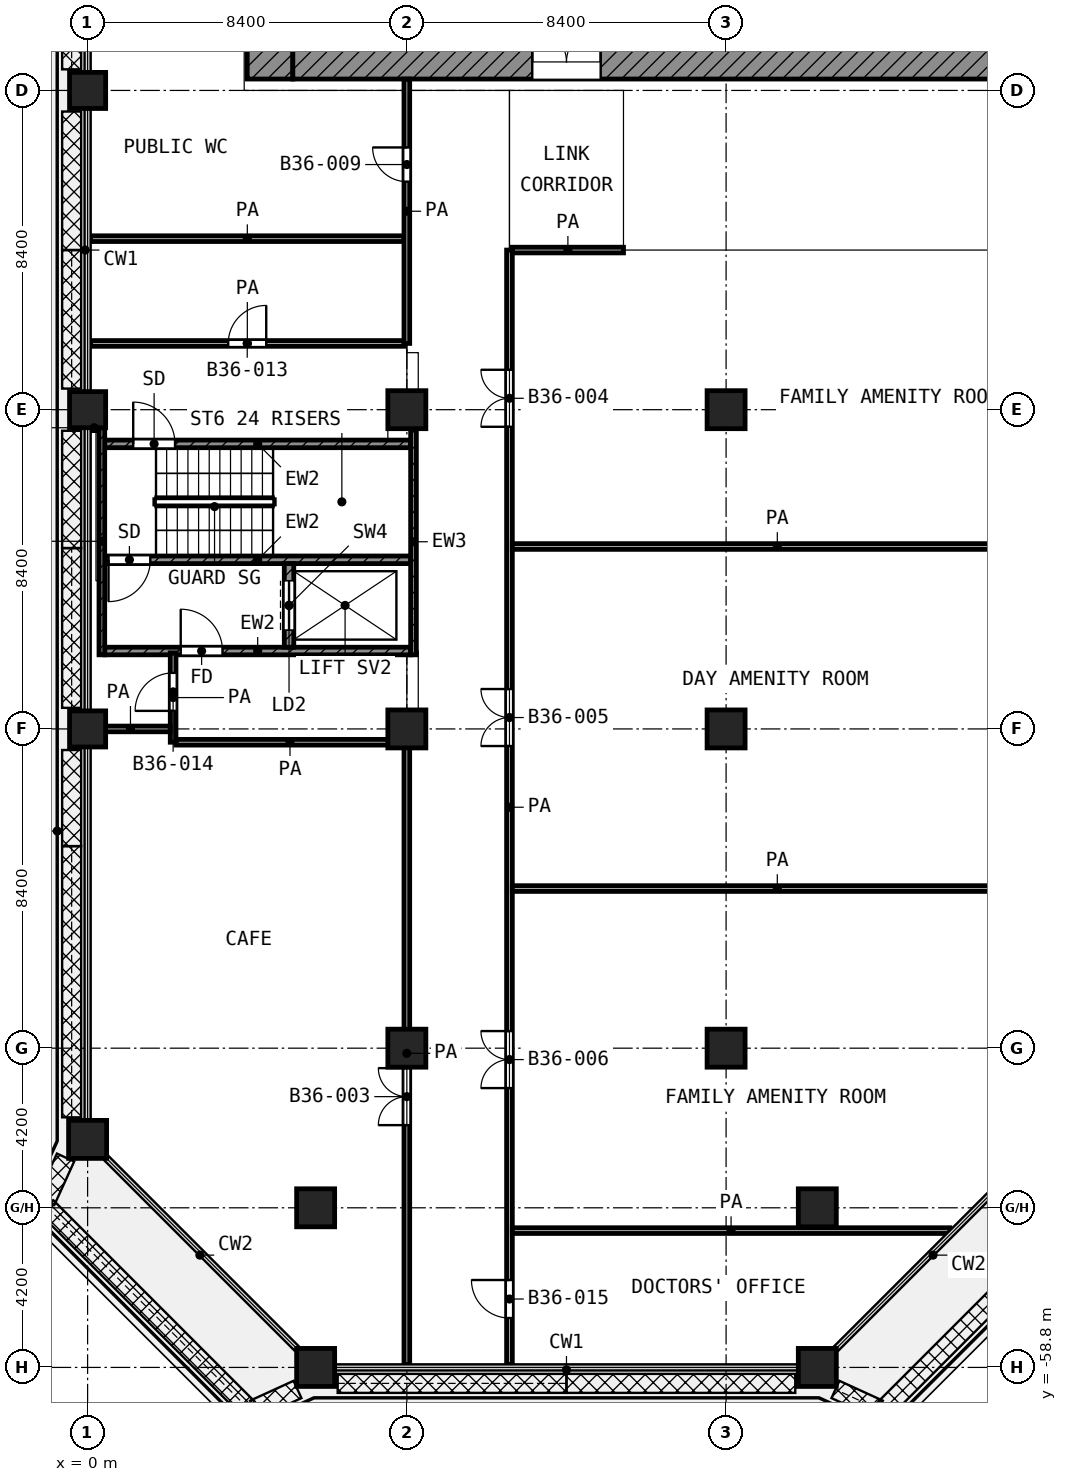
"""IFC4 building model, lengths in metres.
Left out: names, types, materials, properties, quantities, classifications, styles, units other than length and angle.
Written with IfcOpenShell. Run it as: python <this file> out.ifc"""

import sys

from ifc_helpers import new_model, si_unit, direction, frame, frame_2d, origin, origin_2d, place, context, subcontext, project, spatial, rectangle, extrude, element, fill, save


model = new_model("IFC4")
c1 = context("Model", 3, precision=1e-05, world=origin(), true_north=direction((0.0, 1.0)))
c2 = subcontext(c1, "Body", "Model", "MODEL_VIEW")
j1 = project(units=[si_unit("LENGTHUNIT", "METRE"), si_unit("PLANEANGLEUNIT", "RADIAN")], contexts=[c1])
p1 = place(None, origin())
s1 = spatial("IfcSite", under=j1, at=p1, CompositionType="ELEMENT")
p2 = place(p1, origin())
s2 = spatial("IfcBuilding", under=s1, at=p2, CompositionType="ELEMENT")
p3 = place(p2, frame((0.0, 0.0, 158.4)))
s3 = spatial("IfcBuildingStorey", under=s2, at=p3, CompositionType="ELEMENT", Elevation=158.4)
for number, where, z_axis, x_axis in (
    (1, (0.0, -25.2, 0.0), (0.0, 0.0, 1.0), (1.0, 0.0, 0.0)),
    (2, (0.0, -33.6, 0.0), (0.0, 0.0, 1.0), (1.0, 0.0, 0.0)),
):
    element("IfcColumn", number, at=place(p3, frame(where, z_axis=z_axis, x_axis=x_axis)), inside=s3, PredefinedType="COLUMN", context=c2, shape_type="SweptSolid", body=[
        extrude(rectangle(XDim=0.95, YDim=0.95, at=origin_2d()), origin(), (0.0, 0.0, 1.0), 4.2),
    ])
for number, where, z_axis, x_axis in (
    (3, (8.4, -33.6, 0.0), (0.0, 0.0, 1.0), (1.0, 0.0, 0.0)),
    (4, (16.8, -33.6, 0.0), (0.0, 0.0, 1.0), (1.0, 0.0, 0.0)),
):
    element("IfcColumn", number, at=place(p3, frame(where, z_axis=z_axis, x_axis=x_axis)), inside=s3, PredefinedType="COLUMN", context=c2, shape_type="SweptSolid", body=[
        extrude(rectangle(XDim=1.0, YDim=1.0, at=origin_2d()), origin(), (0.0, 0.0, 1.0), 4.2),
    ])
p4 = place(p3, frame((0.0, -42.0, 0.0), z_axis=(0.0, 0.0, 1.0), x_axis=(1.0, 0.0, 0.0)))
e5 = element("IfcColumn", 5, at=p4, inside=s3, PredefinedType="COLUMN", context=c2, shape_type="SweptSolid", body=[
    extrude(rectangle(XDim=0.95, YDim=0.95, at=origin_2d()), origin(), (0.0, 0.0, 1.0), 4.2),
])
for number, where, z_axis, x_axis in (
    (6, (8.4, -42.0, 0.0), (0.0, 0.0, 1.0), (1.0, 0.0, 0.0)),
    (7, (16.8, -42.0, 0.0), (0.0, 0.0, 1.0), (1.0, 0.0, 0.0)),
    (8, (8.4, -50.4, 0.0), (0.0, 0.0, 1.0), (1.0, 0.0, 0.0)),
    (9, (16.8, -50.4, 0.0), (0.0, 0.0, 1.0), (1.0, 0.0, 0.0)),
    (10, (0.0, -52.8, 0.0), (0.0, 0.0, 1.0), (1.0, 0.0, 0.0)),
    (11, (6.0, -54.6, 0.0), (0.0, 0.0, 1.0), (1.0, 0.0, 0.0)),
    (12, (19.2, -54.6, 0.0), (0.0, 0.0, 1.0), (1.0, 0.0, 0.0)),
    (13, (6.0, -58.8, 0.0), (0.0, 0.0, 1.0), (1.0, 0.0, 0.0)),
    (14, (19.2, -58.8, 0.0), (0.0, 0.0, 1.0), (1.0, 0.0, 0.0)),
):
    element("IfcColumn", number, at=place(p3, frame(where, z_axis=z_axis, x_axis=x_axis)), inside=s3, PredefinedType="COLUMN", context=c2, shape_type="SweptSolid", body=[
        extrude(rectangle(XDim=1.0, YDim=1.0, at=origin_2d()), origin(), (0.0, 0.0, 1.0), 4.2),
    ])
p5 = place(p3, frame((4.8, -24.9, 0.0), z_axis=(0.0, 0.0, 1.0), x_axis=(0.0, 1.0, 0.0)))
e15 = element("IfcWall", 15, at=p5, inside=s3, PredefinedType="SHEAR", context=c2, shape_type="SweptSolid", body=[
    extrude(rectangle(XDim=19.5, YDim=1.2, at=frame_2d((9.75, 0.0))), origin(), (0.0, 0.0, 1.0), 3.6),
])
p6 = place(p5, frame((11.35, 0.0, 0.0)))
e16 = element("IfcOpeningElement", 16, at=p6, cuts=e15, PredefinedType="OPENING", context=c2, shape_type="SweptSolid", body=[
    extrude(rectangle(XDim=1.1, YDim=2.1, at=frame_2d((0.55, 1.05))), frame((0.0, 0.61, 0.0), z_axis=(0.0, -1.0, 0.0), x_axis=(1.0, 0.0, 0.0)), (0.0, 0.0, 1.0), 1.22),
])
p7 = place(p5, frame((2.05, 0.0, 0.0)))
e17 = element("IfcOpeningElement", 17, at=p7, cuts=e15, PredefinedType="OPENING", context=c2, shape_type="SweptSolid", body=[
    extrude(rectangle(XDim=1.1, YDim=2.1, at=frame_2d((0.55, 1.05))), frame((0.0, 0.61, 0.0), z_axis=(0.0, -1.0, 0.0), x_axis=(1.0, 0.0, 0.0)), (0.0, 0.0, 1.0), 1.22),
])
p8 = place(p3, frame((5.4, -24.45, 0.0), z_axis=(0.0, 0.0, 1.0), x_axis=(1.0, 0.0, 0.0)))
e18 = element("IfcWall", 18, at=p8, inside=s3, PredefinedType="SHEAR", context=c2, shape_type="SweptSolid", body=[
    extrude(rectangle(XDim=18.6, YDim=0.9, at=frame_2d((9.3, 0.0))), origin(), (0.0, 0.0, 1.0), 3.6),
])
p9 = place(p8, frame((6.3, 0.0, 0.0)))
e19 = element("IfcOpeningElement", 19, at=p9, cuts=e18, PredefinedType="OPENING", context=c2, shape_type="SweptSolid", body=[
    extrude(rectangle(XDim=1.8, YDim=2.1, at=frame_2d((0.9, 1.05))), frame((0.0, 0.46, 0.0), z_axis=(0.0, -1.0, 0.0), x_axis=(1.0, 0.0, 0.0)), (0.0, 0.0, 1.0), 0.92),
])
p10 = place(p3, frame((0.375, -40.05, 0.0), z_axis=(0.0, 0.0, 1.0), x_axis=(0.0, 1.0, 0.0)))
e20 = element("IfcWall", 20, at=p10, inside=s3, PredefinedType="SHEAR", context=c2, shape_type="SweptSolid", body=[
    extrude(rectangle(XDim=5.975, YDim=0.15, at=frame_2d((2.988, 0.0))), origin(), (0.0, 0.0, 1.0), 3.6),
])
p11 = place(p3, frame((8.575, -40.05, 0.0), z_axis=(0.0, 0.0, 1.0), x_axis=(0.0, 1.0, 0.0)))
e21 = element("IfcWall", 21, at=p11, inside=s3, PredefinedType="SHEAR", context=c2, shape_type="SweptSolid", body=[
    extrude(rectangle(XDim=5.95, YDim=0.15, at=frame_2d((2.975, 0.0))), origin(), (0.0, 0.0, 1.0), 3.6),
])
p12 = place(p3, frame((0.45, -34.5, 0.0), z_axis=(0.0, 0.0, 1.0), x_axis=(1.0, 0.0, 0.0)))
e22 = element("IfcWall", 22, at=p12, inside=s3, PredefinedType="SHEAR", context=c2, shape_type="SweptSolid", body=[
    extrude(rectangle(XDim=8.05, YDim=0.2, at=frame_2d((4.025, 0.0))), origin(), (0.0, 0.0, 1.0), 3.6),
])
p13 = place(p12, frame((0.75, 0.0, 0.0)))
e23 = element("IfcOpeningElement", 23, at=p13, cuts=e22, PredefinedType="OPENING", context=c2, shape_type="SweptSolid", body=[
    extrude(rectangle(XDim=1.1, YDim=2.1, at=frame_2d((0.55, 1.05))), frame((0.0, 0.11, 0.0), z_axis=(0.0, -1.0, 0.0), x_axis=(1.0, 0.0, 0.0)), (0.0, 0.0, 1.0), 0.22),
])
p14 = place(p3, frame((0.45, -37.55, 0.0), z_axis=(0.0, 0.0, 1.0), x_axis=(1.0, 0.0, 0.0)))
e24 = element("IfcWall", 24, at=p14, inside=s3, PredefinedType="SHEAR", context=c2, shape_type="SweptSolid", body=[
    extrude(rectangle(XDim=8.05, YDim=0.2, at=frame_2d((4.025, 0.0))), origin(), (0.0, 0.0, 1.0), 3.6),
])
p15 = place(p14, frame((0.1, 0.0, 0.0)))
e25 = element("IfcOpeningElement", 25, at=p15, cuts=e24, PredefinedType="OPENING", context=c2, shape_type="SweptSolid", body=[
    extrude(rectangle(XDim=1.1, YDim=2.1, at=frame_2d((0.55, 1.05))), frame((0.0, 0.11, 0.0), z_axis=(0.0, -1.0, 0.0), x_axis=(1.0, 0.0, 0.0)), (0.0, 0.0, 1.0), 0.22),
])
p16 = place(p3, frame((0.45, -39.95, 0.0), z_axis=(0.0, 0.0, 1.0), x_axis=(1.0, 0.0, 0.0)))
e26 = element("IfcWall", 26, at=p16, inside=s3, PredefinedType="SHEAR", context=c2, shape_type="SweptSolid", body=[
    extrude(rectangle(XDim=8.05, YDim=0.2, at=frame_2d((4.025, 0.0))), origin(), (0.0, 0.0, 1.0), 3.6),
])
p17 = place(p16, frame((2.0, 0.0, 0.0)))
e27 = element("IfcOpeningElement", 27, at=p17, cuts=e26, PredefinedType="OPENING", context=c2, shape_type="SweptSolid", body=[
    extrude(rectangle(XDim=1.1, YDim=2.1, at=frame_2d((0.55, 1.05))), frame((0.0, 0.11, 0.0), z_axis=(0.0, -1.0, 0.0), x_axis=(1.0, 0.0, 0.0)), (0.0, 0.0, 1.0), 0.22),
])
p18 = place(p3, frame((5.3, -39.85, 0.0), z_axis=(0.0, 0.0, 1.0), x_axis=(0.0, 1.0, 0.0)))
e28 = element("IfcWall", 28, at=p18, inside=s3, PredefinedType="SHEAR", context=c2, shape_type="SweptSolid", body=[
    extrude(rectangle(XDim=2.2, YDim=0.25, at=frame_2d((1.1, 0.0))), origin(), (0.0, 0.0, 1.0), 3.6),
])
p19 = place(p18, frame((0.45, 0.0, 0.0)))
e29 = element("IfcOpeningElement", 29, at=p19, cuts=e28, PredefinedType="OPENING", context=c2, shape_type="SweptSolid", body=[
    extrude(rectangle(XDim=1.3, YDim=2.1, at=frame_2d((0.65, 1.05))), frame((0.0, 0.135, 0.0), z_axis=(0.0, -1.0, 0.0), x_axis=(1.0, 0.0, 0.0)), (0.0, 0.0, 1.0), 0.27),
])
p20 = place(p3, frame((11.175, -55.2, 0.0), z_axis=(0.0, 0.0, 1.0), x_axis=(1.0, 0.0, 0.0)))
e30 = element("IfcWall", 30, at=p20, inside=s3, PredefinedType="PARTITIONING", context=c2, shape_type="SweptSolid", body=[
    extrude(rectangle(XDim=11.512, YDim=0.15, at=frame_2d((5.756, 0.0))), origin(), (0.0, 0.0, 1.0), 3.6),
])
p21 = place(p3, frame((11.175, -46.2, 0.0), z_axis=(0.0, 0.0, 1.0), x_axis=(1.0, 0.0, 0.0)))
e31 = element("IfcWall", 31, at=p21, inside=s3, PredefinedType="PARTITIONING", context=c2, shape_type="SweptSolid", body=[
    extrude(rectangle(XDim=13.945, YDim=0.15, at=frame_2d((6.973, 0.0))), origin(), (0.0, 0.0, 1.0), 3.6),
])
p22 = place(p3, frame((2.325, -42.35, 0.0), z_axis=(0.0, 0.0, 1.0), x_axis=(1.0, 0.0, 0.0)))
e32 = element("IfcWall", 32, at=p22, inside=s3, PredefinedType="PARTITIONING", context=c2, shape_type="SweptSolid", body=[
    extrude(rectangle(XDim=6.0, YDim=0.15, at=frame_2d((3.0, 0.0))), origin(), (0.0, 0.0, 1.0), 3.6),
])
p23 = place(p3, frame((0.08, -42.0, 0.0), z_axis=(0.0, 0.0, 1.0), x_axis=(1.0, 0.0, 0.0)))
e33 = element("IfcWall", 33, at=p23, inside=s3, PredefinedType="PARTITIONING", context=c2, shape_type="SweptSolid", body=[
    extrude(rectangle(XDim=2.095, YDim=0.15, at=frame_2d((1.047, 0.0))), origin(), (0.0, 0.0, 1.0), 3.6),
])
p24 = place(p3, frame((11.175, -37.2, 0.0), z_axis=(0.0, 0.0, 1.0), x_axis=(1.0, 0.0, 0.0)))
e34 = element("IfcWall", 34, at=p24, inside=s3, PredefinedType="PARTITIONING", context=c2, shape_type="SweptSolid", body=[
    extrude(rectangle(XDim=13.945, YDim=0.15, at=frame_2d((6.973, 0.0))), origin(), (0.0, 0.0, 1.0), 3.6),
])
p25 = place(p3, frame((0.08, -34.075, 0.0), z_axis=(0.0, 0.0, 1.0), x_axis=(1.0, 0.0, 0.0)))
e35 = element("IfcWall", 35, at=p25, inside=s3, PredefinedType="PARTITIONING", context=c2, shape_type="SweptSolid", body=[
    extrude(rectangle(XDim=0.19, YDim=0.15, at=frame_2d((0.095, 0.0))), origin(), (0.0, 0.0, 1.0), 3.6),
])
p26 = place(p3, frame((0.08, -31.857, 0.0), z_axis=(0.0, 0.0, 1.0), x_axis=(1.0, 0.0, 0.0)))
e36 = element("IfcWall", 36, at=p26, inside=s3, PredefinedType="PARTITIONING", context=c2, shape_type="SweptSolid", body=[
    extrude(rectangle(XDim=8.245, YDim=0.15, at=frame_2d((4.123, 0.0))), origin(), (0.0, 0.0, 1.0), 3.6),
])
p27 = place(p26, frame((3.62, 0.0, 0.0)))
e37 = element("IfcOpeningElement", 37, at=p27, cuts=e36, PredefinedType="OPENING", context=c2, shape_type="SweptSolid", body=[
    extrude(rectangle(XDim=1.0, YDim=2.1, at=frame_2d((0.5, 1.05))), frame((0.0, 0.085, 0.0), z_axis=(0.0, -1.0, 0.0), x_axis=(1.0, 0.0, 0.0)), (0.0, 0.0, 1.0), 0.17),
])
p28 = place(p3, frame((11.175, -29.4, 0.0), z_axis=(0.0, 0.0, 1.0), x_axis=(1.0, 0.0, 0.0)))
e38 = element("IfcWall", 38, at=p28, inside=s3, PredefinedType="PARTITIONING", context=c2, shape_type="SweptSolid", body=[
    extrude(rectangle(XDim=2.925, YDim=0.15, at=frame_2d((1.462, 0.0))), origin(), (0.0, 0.0, 1.0), 3.6),
])
p29 = place(p3, frame((0.08, -29.1, 0.0), z_axis=(0.0, 0.0, 1.0), x_axis=(1.0, 0.0, 0.0)))
e39 = element("IfcWall", 39, at=p29, inside=s3, PredefinedType="PARTITIONING", context=c2, shape_type="SweptSolid", body=[
    extrude(rectangle(XDim=8.245, YDim=0.15, at=frame_2d((4.123, 0.0))), origin(), (0.0, 0.0, 1.0), 3.6),
])
p30 = place(p3, frame((2.25, -42.35, 0.0), z_axis=(0.0, 0.0, 1.0), x_axis=(0.0, 1.0, 0.0)))
e40 = element("IfcWall", 40, at=p30, inside=s3, PredefinedType="PARTITIONING", context=c2, shape_type="SweptSolid", body=[
    extrude(rectangle(XDim=2.35, YDim=0.15, at=frame_2d((1.175, 0.0))), origin(), (0.0, 0.0, 1.0), 3.6),
])
p31 = place(p30, frame((0.825, 0.0, 0.0)))
e41 = element("IfcOpeningElement", 41, at=p31, cuts=e40, PredefinedType="OPENING", context=c2, shape_type="SweptSolid", body=[
    extrude(rectangle(XDim=1.0, YDim=2.1, at=frame_2d((0.5, 1.05))), frame((0.0, 0.085, 0.0), z_axis=(0.0, -1.0, 0.0), x_axis=(1.0, 0.0, 0.0)), (0.0, 0.0, 1.0), 0.17),
])
p32 = place(p3, frame((8.4, -58.72, 0.0), z_axis=(0.0, 0.0, 1.0), x_axis=(0.0, 1.0, 0.0)))
e42 = element("IfcWall", 42, at=p32, inside=s3, PredefinedType="PARTITIONING", context=c2, shape_type="SweptSolid", body=[
    extrude(rectangle(XDim=16.37, YDim=0.15, at=frame_2d((8.185, 0.0))), origin(), (0.0, 0.0, 1.0), 3.6),
])
p33 = place(p32, frame((6.295, 0.0, 0.0)))
e43 = element("IfcOpeningElement", 43, at=p33, cuts=e42, PredefinedType="OPENING", context=c2, shape_type="SweptSolid", body=[
    extrude(rectangle(XDim=1.5, YDim=2.1, at=frame_2d((0.75, 1.05))), frame((0.0, 0.085, 0.0), z_axis=(0.0, -1.0, 0.0), x_axis=(1.0, 0.0, 0.0)), (0.0, 0.0, 1.0), 0.17),
])
p34 = place(p3, frame((8.4, -31.857, 0.0), z_axis=(0.0, 0.0, 1.0), x_axis=(0.0, 1.0, 0.0)))
e44 = element("IfcWall", 44, at=p34, inside=s3, PredefinedType="PARTITIONING", context=c2, shape_type="SweptSolid", body=[
    extrude(rectangle(XDim=6.957, YDim=0.15, at=frame_2d((3.479, 0.0))), origin(), (0.0, 0.0, 1.0), 3.6),
])
p35 = place(p34, frame((4.257, 0.0, 0.0)))
e45 = element("IfcOpeningElement", 45, at=p35, cuts=e44, PredefinedType="OPENING", context=c2, shape_type="SweptSolid", body=[
    extrude(rectangle(XDim=0.9, YDim=2.1, at=frame_2d((0.45, 1.05))), frame((0.0, 0.085, 0.0), z_axis=(0.0, -1.0, 0.0), x_axis=(1.0, 0.0, 0.0)), (0.0, 0.0, 1.0), 0.17),
])
p36 = place(p3, frame((11.1, -58.72, 0.0), z_axis=(0.0, 0.0, 1.0), x_axis=(0.0, 1.0, 0.0)))
e46 = element("IfcWall", 46, at=p36, inside=s3, PredefinedType="PARTITIONING", context=c2, shape_type="SweptSolid", body=[
    extrude(rectangle(XDim=29.32, YDim=0.15, at=frame_2d((14.66, 0.0))), origin(), (0.0, 0.0, 1.0), 3.6),
])
p37 = place(p36, frame((24.67, 0.0, 0.0)))
e47 = element("IfcOpeningElement", 47, at=p37, cuts=e46, PredefinedType="OPENING", context=c2, shape_type="SweptSolid", body=[
    extrude(rectangle(XDim=1.5, YDim=2.1, at=frame_2d((0.75, 1.05))), frame((0.0, 0.085, 0.0), z_axis=(0.0, -1.0, 0.0), x_axis=(1.0, 0.0, 0.0)), (0.0, 0.0, 1.0), 0.17),
])
p38 = place(p36, frame((16.27, 0.0, 0.0)))
e48 = element("IfcOpeningElement", 48, at=p38, cuts=e46, PredefinedType="OPENING", context=c2, shape_type="SweptSolid", body=[
    extrude(rectangle(XDim=1.5, YDim=2.1, at=frame_2d((0.75, 1.05))), frame((0.0, 0.085, 0.0), z_axis=(0.0, -1.0, 0.0), x_axis=(1.0, 0.0, 0.0)), (0.0, 0.0, 1.0), 0.17),
])
p39 = place(p36, frame((7.27, 0.0, 0.0)))
e49 = element("IfcOpeningElement", 49, at=p39, cuts=e46, PredefinedType="OPENING", context=c2, shape_type="SweptSolid", body=[
    extrude(rectangle(XDim=1.5, YDim=2.1, at=frame_2d((0.75, 1.05))), frame((0.0, 0.085, 0.0), z_axis=(0.0, -1.0, 0.0), x_axis=(1.0, 0.0, 0.0)), (0.0, 0.0, 1.0), 0.17),
])
p40 = place(p36, frame((1.22, 0.0, 0.0)))
e50 = element("IfcOpeningElement", 50, at=p40, cuts=e46, PredefinedType="OPENING", context=c2, shape_type="SweptSolid", body=[
    extrude(rectangle(XDim=1.0, YDim=2.1, at=frame_2d((0.5, 1.05))), frame((0.0, 0.085, 0.0), z_axis=(0.0, -1.0, 0.0), x_axis=(1.0, 0.0, 0.0)), (0.0, 0.0, 1.0), 0.17),
])
p41 = place(p9, origin())
e51 = element("IfcDoor", 51, at=p41, inside=s3, OperationType="DOUBLE_DOOR_SINGLE_SWING", PredefinedType="DOOR", context=c2, shape_type="SweptSolid", body=[
    extrude(rectangle(XDim=1.8, YDim=2.1, at=frame_2d((0.9, 1.05))), frame((0.0, 0.025, 0.0), z_axis=(0.0, -1.0, 0.0), x_axis=(1.0, 0.0, 0.0)), (0.0, 0.0, 1.0), 0.05),
])
fill(e19, e51)
p42 = place(p13, origin())
e52 = element("IfcDoor", 52, at=p42, inside=s3, OperationType="SINGLE_SWING_LEFT", PredefinedType="DOOR", context=c2, shape_type="SweptSolid", body=[
    extrude(rectangle(XDim=1.1, YDim=2.1, at=frame_2d((0.55, 1.05))), frame((0.0, 0.025, 0.0), z_axis=(0.0, -1.0, 0.0), x_axis=(1.0, 0.0, 0.0)), (0.0, 0.0, 1.0), 0.05),
])
fill(e23, e52)
p43 = place(p15, frame((1.1, 0.0, 0.0), z_axis=(0.0, 0.0, 1.0), x_axis=(-1.0, 0.0, 0.0)))
e53 = element("IfcDoor", 53, at=p43, inside=s3, OperationType="SINGLE_SWING_LEFT", PredefinedType="DOOR", context=c2, shape_type="SweptSolid", body=[
    extrude(rectangle(XDim=1.1, YDim=2.1, at=frame_2d((0.55, 1.05))), frame((0.0, 0.025, 0.0), z_axis=(0.0, -1.0, 0.0), x_axis=(1.0, 0.0, 0.0)), (0.0, 0.0, 1.0), 0.05),
])
fill(e25, e53)
p44 = place(p19, origin())
e54 = element("IfcDoor", 54, at=p44, inside=s3, OperationType="DOUBLE_DOOR_SLIDING", PredefinedType="DOOR", context=c2, shape_type="SweptSolid", body=[
    extrude(rectangle(XDim=1.3, YDim=2.1, at=frame_2d((0.65, 1.05))), frame((0.0, 0.025, 0.0), z_axis=(0.0, -1.0, 0.0), x_axis=(1.0, 0.0, 0.0)), (0.0, 0.0, 1.0), 0.05),
])
fill(e29, e54)
p45 = place(p17, origin())
e55 = element("IfcDoor", 55, at=p45, inside=s3, OperationType="SINGLE_SWING_LEFT", PredefinedType="DOOR", context=c2, shape_type="SweptSolid", body=[
    extrude(rectangle(XDim=1.1, YDim=2.1, at=frame_2d((0.55, 1.05))), frame((0.0, 0.025, 0.0), z_axis=(0.0, -1.0, 0.0), x_axis=(1.0, 0.0, 0.0)), (0.0, 0.0, 1.0), 0.05),
])
fill(e27, e55)
p46 = place(p35, origin())
e56 = element("IfcDoor", 56, at=p46, inside=s3, OperationType="SINGLE_SWING_RIGHT", PredefinedType="DOOR", context=c2, shape_type="SweptSolid", body=[
    extrude(rectangle(XDim=0.9, YDim=2.1, at=frame_2d((0.45, 1.05))), frame((0.0, 0.025, 0.0), z_axis=(0.0, -1.0, 0.0), x_axis=(1.0, 0.0, 0.0)), (0.0, 0.0, 1.0), 0.05),
])
fill(e45, e56)
p47 = place(p27, origin())
e57 = element("IfcDoor", 57, at=p47, inside=s3, OperationType="SINGLE_SWING_RIGHT", PredefinedType="DOOR", context=c2, shape_type="SweptSolid", body=[
    extrude(rectangle(XDim=1.0, YDim=2.1, at=frame_2d((0.5, 1.05))), frame((0.0, 0.025, 0.0), z_axis=(0.0, -1.0, 0.0), x_axis=(1.0, 0.0, 0.0)), (0.0, 0.0, 1.0), 0.05),
])
fill(e37, e57)
p48 = place(p31, origin())
e58 = element("IfcDoor", 58, at=p48, inside=s3, OperationType="SINGLE_SWING_LEFT", PredefinedType="DOOR", context=c2, shape_type="SweptSolid", body=[
    extrude(rectangle(XDim=1.0, YDim=2.1, at=frame_2d((0.5, 1.05))), frame((0.0, 0.025, 0.0), z_axis=(0.0, -1.0, 0.0), x_axis=(1.0, 0.0, 0.0)), (0.0, 0.0, 1.0), 0.05),
])
fill(e41, e58)
p49 = place(p33, origin())
e59 = element("IfcDoor", 59, at=p49, inside=s3, OperationType="DOUBLE_DOOR_SINGLE_SWING", PredefinedType="DOOR", context=c2, shape_type="SweptSolid", body=[
    extrude(rectangle(XDim=1.5, YDim=2.1, at=frame_2d((0.75, 1.05))), frame((0.0, 0.025, 0.0), z_axis=(0.0, -1.0, 0.0), x_axis=(1.0, 0.0, 0.0)), (0.0, 0.0, 1.0), 0.05),
])
fill(e43, e59)
p50 = place(p37, origin())
e60 = element("IfcDoor", 60, at=p50, inside=s3, OperationType="DOUBLE_DOOR_SINGLE_SWING", PredefinedType="DOOR", context=c2, shape_type="SweptSolid", body=[
    extrude(rectangle(XDim=1.5, YDim=2.1, at=frame_2d((0.75, 1.05))), frame((0.0, 0.025, 0.0), z_axis=(0.0, -1.0, 0.0), x_axis=(1.0, 0.0, 0.0)), (0.0, 0.0, 1.0), 0.05),
])
fill(e47, e60)
p51 = place(p38, origin())
e61 = element("IfcDoor", 61, at=p51, inside=s3, OperationType="DOUBLE_DOOR_SINGLE_SWING", PredefinedType="DOOR", context=c2, shape_type="SweptSolid", body=[
    extrude(rectangle(XDim=1.5, YDim=2.1, at=frame_2d((0.75, 1.05))), frame((0.0, 0.025, 0.0), z_axis=(0.0, -1.0, 0.0), x_axis=(1.0, 0.0, 0.0)), (0.0, 0.0, 1.0), 0.05),
])
fill(e48, e61)
p52 = place(p39, origin())
e62 = element("IfcDoor", 62, at=p52, inside=s3, OperationType="DOUBLE_DOOR_SINGLE_SWING", PredefinedType="DOOR", context=c2, shape_type="SweptSolid", body=[
    extrude(rectangle(XDim=1.5, YDim=2.1, at=frame_2d((0.75, 1.05))), frame((0.0, 0.025, 0.0), z_axis=(0.0, -1.0, 0.0), x_axis=(1.0, 0.0, 0.0)), (0.0, 0.0, 1.0), 0.05),
])
fill(e49, e62)
p53 = place(p40, origin())
e63 = element("IfcDoor", 63, at=p53, inside=s3, OperationType="SINGLE_SWING_RIGHT", PredefinedType="DOOR", context=c2, shape_type="SweptSolid", body=[
    extrude(rectangle(XDim=1.0, YDim=2.1, at=frame_2d((0.5, 1.05))), frame((0.0, 0.025, 0.0), z_axis=(0.0, -1.0, 0.0), x_axis=(1.0, 0.0, 0.0)), (0.0, 0.0, 1.0), 0.05),
])
fill(e50, e63)
save(model, sys.argv[1])
